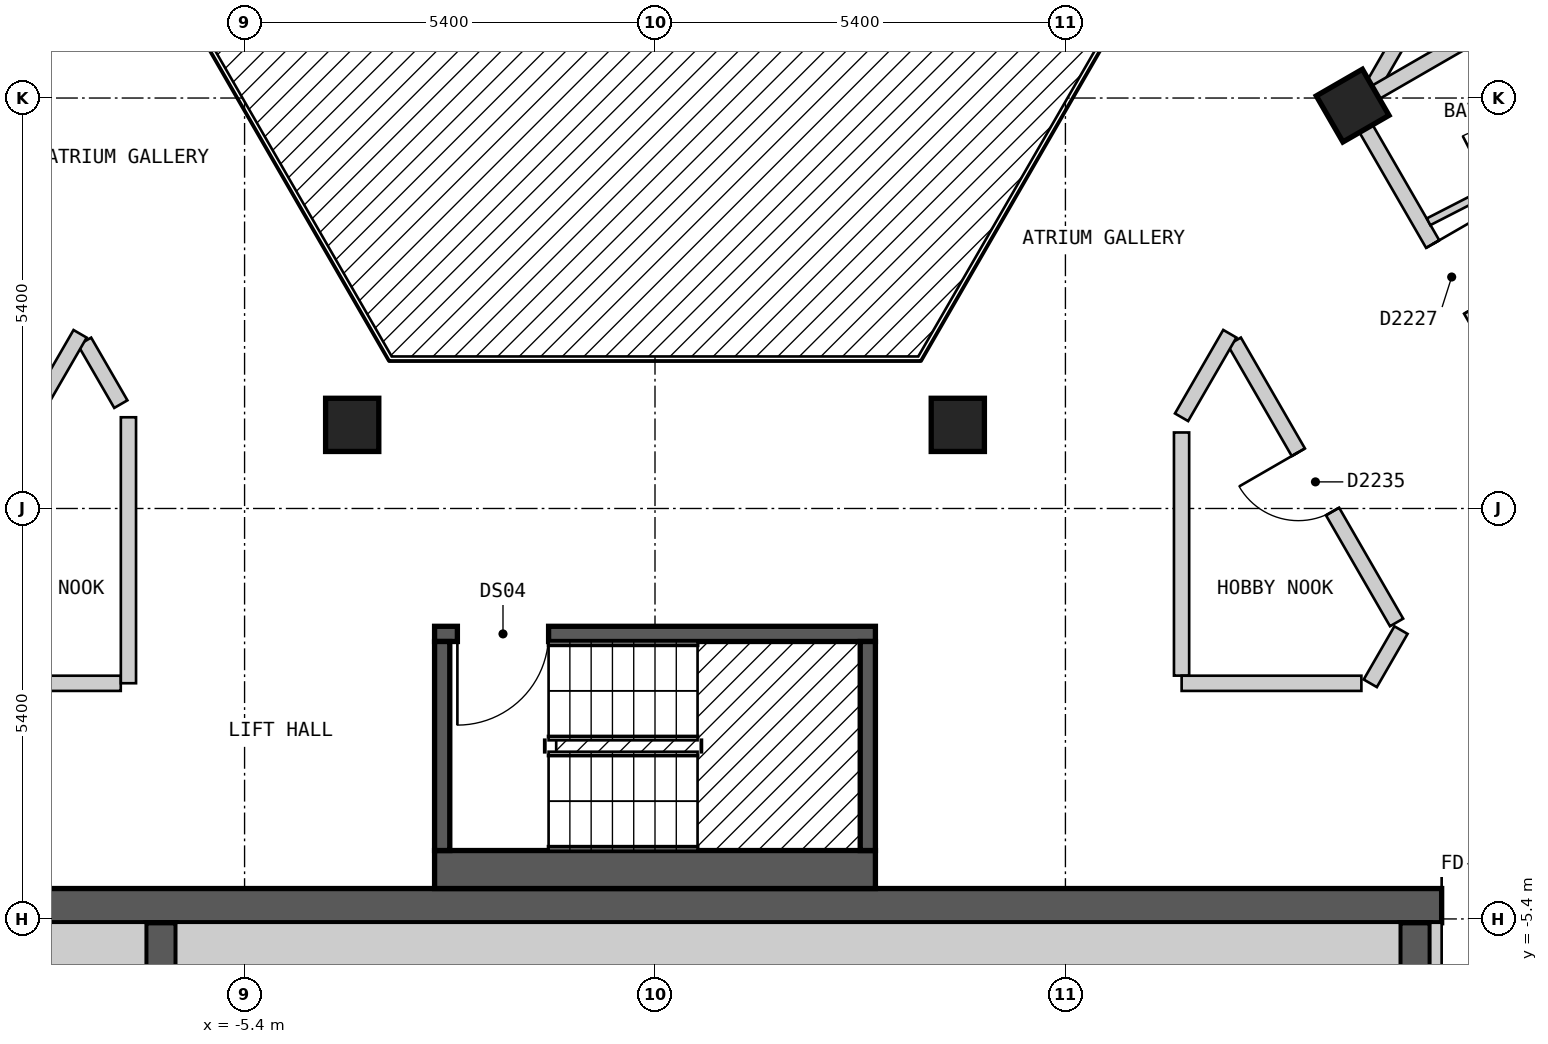
"""IFC4 building model, lengths in metres.
Left out: names, types, materials, properties, quantities, classifications, styles, units other than length and angle.
Written with IfcOpenShell. Run it as: python <this file> out.ifc"""

import sys

from ifc_helpers import new_model, si_unit, direction, frame, frame_2d, origin, origin_2d, place, context, subcontext, project, spatial, rectangle, extrude, element, fill, save


model = new_model("IFC4")
c1 = context("Model", 3, precision=1e-05, world=origin(), true_north=direction((0.0, 1.0)))
c2 = subcontext(c1, "Body", "Model", "MODEL_VIEW")
j1 = project(units=[si_unit("LENGTHUNIT", "METRE"), si_unit("PLANEANGLEUNIT", "RADIAN")], contexts=[c1])
p1 = place(None, origin())
s1 = spatial("IfcSite", under=j1, at=p1, CompositionType="ELEMENT")
p2 = place(p1, origin())
s2 = spatial("IfcBuilding", under=s1, at=p2, CompositionType="ELEMENT")
p3 = place(p2, frame((0.0, 0.0, 235.8)))
s3 = spatial("IfcBuildingStorey", under=s2, at=p3, CompositionType="ELEMENT", Elevation=235.8)
for number, where, z_axis, x_axis in (
    (1, (3.984, 1.1, 0.0), (0.0, 0.0, 1.0), (1.0, 0.0, 0.0)),
    (2, (9.179, 5.3, 0.0), (0.0, 0.0, 1.0), (-0.5, 0.866, 0.0)),
    (3, (-3.984, 1.1, 0.0), (0.0, 0.0, 1.0), (1.0, 0.0, 0.0)),
):
    element("IfcColumn", number, at=place(p3, frame(where, z_axis=z_axis, x_axis=x_axis)), inside=s3, PredefinedType="COLUMN", context=c2, shape_type="SweptSolid", body=[
        extrude(rectangle(XDim=0.7, YDim=0.7, at=origin_2d()), origin(), (0.0, 0.0, 1.0), 3.0),
    ])
p4 = place(p3, frame((-13.3, -5.225, 0.0), z_axis=(0.0, 0.0, 1.0), x_axis=(1.0, 0.0, 0.0)))
e4 = element("IfcWall", 4, at=p4, inside=s3, PredefinedType="SHEAR", context=c2, shape_type="SweptSolid", body=[
    extrude(rectangle(XDim=26.6, YDim=0.45, at=frame_2d((13.3, 0.0))), origin(), (0.0, 0.0, 1.0), 2.7),
])
p5 = place(p4, frame((23.65, 0.0, 0.0)))
e5 = element("IfcOpeningElement", 5, at=p5, cuts=e4, PredefinedType="OPENING", context=c2, shape_type="SweptSolid", body=[
    extrude(rectangle(XDim=1.2, YDim=2.1, at=frame_2d((0.6, 1.05))), frame((0.0, 0.235, 0.0), z_axis=(0.0, -1.0, 0.0), x_axis=(1.0, 0.0, 0.0)), (0.0, 0.0, 1.0), 0.47),
])
for number, where, z_axis, x_axis in (
    (6, (-6.5, -9.15, 0.0), (0.0, 0.0, 1.0), (0.0, 1.0, 0.0)),
    (7, (10.0, -9.15, 0.0), (0.0, 0.0, 1.0), (0.0, 1.0, 0.0)),
):
    element("IfcWall", number, at=place(p3, frame(where, z_axis=z_axis, x_axis=x_axis)), inside=s3, PredefinedType="SHEAR", context=c2, shape_type="SweptSolid", body=[
        extrude(rectangle(XDim=3.7, YDim=0.4, at=frame_2d((1.85, 0.0))), origin(), (0.0, 0.0, 1.0), 2.7),
    ])
p6 = place(p3, frame((-2.9, -4.75, 0.0), z_axis=(0.0, 0.0, 1.0), x_axis=(1.0, 0.0, 0.0)))
e8 = element("IfcWall", 8, at=p6, inside=s3, PredefinedType="SOLIDWALL", context=c2, shape_type="SweptSolid", body=[
    extrude(rectangle(XDim=5.8, YDim=0.5, at=frame_2d((2.9, 0.0))), origin(), (0.0, 0.0, 1.0), 2.7),
])
p7 = place(p3, frame((-2.9, -1.65, 0.0), z_axis=(0.0, 0.0, 1.0), x_axis=(1.0, 0.0, 0.0)))
e9 = element("IfcWall", 9, at=p7, inside=s3, PredefinedType="SOLIDWALL", context=c2, shape_type="SweptSolid", body=[
    extrude(rectangle(XDim=5.8, YDim=0.2, at=frame_2d((2.9, 0.0))), origin(), (0.0, 0.0, 1.0), 2.7),
])
p8 = place(p7, frame((0.3, 0.0, 0.0)))
e10 = element("IfcOpeningElement", 10, at=p8, cuts=e9, PredefinedType="OPENING", context=c2, shape_type="SweptSolid", body=[
    extrude(rectangle(XDim=1.2, YDim=2.1, at=frame_2d((0.6, 1.05))), frame((0.0, 0.11, 0.0), z_axis=(0.0, -1.0, 0.0), x_axis=(1.0, 0.0, 0.0)), (0.0, 0.0, 1.0), 0.22),
])
for number, where, z_axis, x_axis in (
    (11, (-2.8, -4.5, 0.0), (0.0, 0.0, 1.0), (0.0, 1.0, 0.0)),
    (12, (2.8, -4.5, 0.0), (0.0, 0.0, 1.0), (0.0, 1.0, 0.0)),
):
    element("IfcWall", number, at=place(p3, frame(where, z_axis=z_axis, x_axis=x_axis)), inside=s3, PredefinedType="SOLIDWALL", context=c2, shape_type="SweptSolid", body=[
        extrude(rectangle(XDim=2.75, YDim=0.2, at=frame_2d((1.375, 0.0))), origin(), (0.0, 0.0, 1.0), 2.7),
    ])
p9 = place(p3, frame((-7.505, 2.198, 0.0), z_axis=(0.0, 0.0, 1.0), x_axis=(0.500409926597, -0.865788603161, 0.0)))
e13 = element("IfcWall", 13, at=p9, inside=s3, PredefinedType="PARTITIONING", context=c2, shape_type="SweptSolid", body=[
    extrude(rectangle(XDim=0.953, YDim=0.2, at=frame_2d((0.477, 0.0))), origin(), (0.0, 0.0, 1.0), 2.7),
])
p10 = place(p3, frame((7.622, 2.199, 0.0), z_axis=(0.0, 0.0, 1.0), x_axis=(0.499994660107, -0.866028486751, 0.0)))
e14 = element("IfcWall", 14, at=p10, inside=s3, PredefinedType="PARTITIONING", context=c2, shape_type="SweptSolid", body=[
    extrude(rectangle(XDim=4.27, YDim=0.2, at=frame_2d((2.135, 0.0))), origin(), (0.0, 0.0, 1.0), 2.7),
])
p11 = place(p10, frame((1.685, 0.0, 0.0)))
e15 = element("IfcOpeningElement", 15, at=p11, cuts=e14, PredefinedType="OPENING", context=c2, shape_type="SweptSolid", body=[
    extrude(rectangle(XDim=0.9, YDim=2.1, at=frame_2d((0.45, 1.05))), frame((0.0, 0.11, 0.0), z_axis=(0.0, -1.0, 0.0), x_axis=(1.0, 0.0, 0.0)), (0.0, 0.0, 1.0), 0.22),
])
p12 = place(p3, frame((9.238, 5.2, 0.0), z_axis=(0.0, 0.0, 1.0), x_axis=(0.500025705601, -0.86601056214, 0.0)))
e16 = element("IfcWall", 16, at=p12, inside=s3, PredefinedType="PARTITIONING", context=c2, shape_type="SweptSolid", body=[
    extrude(rectangle(XDim=7.735, YDim=0.2, at=frame_2d((3.868, 0.0))), origin(), (0.0, 0.0, 1.0), 2.7),
])
p13 = place(p12, frame((6.898, 0.0, 0.0)))
e17 = element("IfcOpeningElement", 17, at=p13, cuts=e16, PredefinedType="OPENING", context=c2, shape_type="SweptSolid", body=[
    extrude(rectangle(XDim=0.8, YDim=2.1, at=frame_2d((0.4, 1.05))), frame((0.0, 0.11, 0.0), z_axis=(0.0, -1.0, 0.0), x_axis=(1.0, 0.0, 0.0)), (0.0, 0.0, 1.0), 0.22),
])
p14 = place(p12, frame((1.988, 0.0, 0.0)))
e18 = element("IfcOpeningElement", 18, at=p14, cuts=e16, PredefinedType="OPENING", context=c2, shape_type="SweptSolid", body=[
    extrude(rectangle(XDim=1.0, YDim=2.1, at=frame_2d((0.5, 1.05))), frame((0.0, 0.11, 0.0), z_axis=(0.0, -1.0, 0.0), x_axis=(1.0, 0.0, 0.0)), (0.0, 0.0, 1.0), 0.22),
])
p15 = place(p3, frame((6.928, 1.0, 0.0), z_axis=(0.0, 0.0, 1.0), x_axis=(0.0, -1.0, 0.0)))
e19 = element("IfcWall", 19, at=p15, inside=s3, PredefinedType="PARTITIONING", context=c2, shape_type="SweptSolid", body=[
    extrude(rectangle(XDim=3.199, YDim=0.2, at=frame_2d((1.6, 0.0))), origin(), (0.0, 0.0, 1.0), 2.7),
])
p16 = place(p3, frame((-9.41, -2.3, 0.0), z_axis=(0.0, 0.0, 1.0), x_axis=(1.0, 0.0, 0.0)))
e20 = element("IfcWall", 20, at=p16, inside=s3, PredefinedType="PARTITIONING", context=c2, shape_type="SweptSolid", body=[
    extrude(rectangle(XDim=2.381, YDim=0.2, at=frame_2d((1.19, 0.0))), origin(), (0.0, 0.0, 1.0), 2.7),
])
p17 = place(p3, frame((6.929, -2.3, 0.0), z_axis=(0.0, 0.0, 1.0), x_axis=(1.0, 0.0, 0.0)))
e21 = element("IfcWall", 21, at=p17, inside=s3, PredefinedType="PARTITIONING", context=c2, shape_type="SweptSolid", body=[
    extrude(rectangle(XDim=2.365, YDim=0.2, at=frame_2d((1.183, 0.0))), origin(), (0.0, 0.0, 1.0), 2.7),
])
p18 = place(p3, frame((6.928, 1.2, 0.0), z_axis=(0.0, 0.0, 1.0), x_axis=(0.500255167297, 0.865878032746, 0.0)))
e22 = element("IfcWall", 22, at=p18, inside=s3, PredefinedType="PARTITIONING", context=c2, shape_type="SweptSolid", body=[
    extrude(rectangle(XDim=1.269, YDim=0.2, at=frame_2d((0.635, 0.0))), origin(), (0.0, 0.0, 1.0), 2.7),
])
p19 = place(p3, frame((9.354, 5.401, 0.0), z_axis=(0.0, 0.0, 1.0), x_axis=(0.499849222119, 0.866112437936, 0.0)))
e23 = element("IfcWall", 23, at=p19, inside=s3, PredefinedType="PARTITIONING", context=c2, shape_type="SweptSolid", body=[
    extrude(rectangle(XDim=3.001, YDim=0.2, at=frame_2d((1.5, 0.0))), origin(), (0.0, 0.0, 1.0), 2.7),
])
p20 = place(p3, frame((9.411, -2.3, 0.0), z_axis=(0.0, 0.0, 1.0), x_axis=(0.499940363534, 0.866059832176, 0.0)))
e24 = element("IfcWall", 24, at=p20, inside=s3, PredefinedType="PARTITIONING", context=c2, shape_type="SweptSolid", body=[
    extrude(rectangle(XDim=0.808, YDim=0.2, at=frame_2d((0.404, 0.0))), origin(), (0.0, 0.0, 1.0), 2.7),
])
p21 = place(p3, frame((-9.815, -1.6, 0.0), z_axis=(0.0, 0.0, 1.0), x_axis=(0.500058909736, 0.865991389561, 0.0)))
e25 = element("IfcWall", 25, at=p21, inside=s3, PredefinedType="PARTITIONING", context=c2, shape_type="SweptSolid", body=[
    extrude(rectangle(XDim=4.501, YDim=0.2, at=frame_2d((2.251, 0.0))), origin(), (0.0, 0.0, 1.0), 2.7),
])
p22 = place(p21, frame((1.801, 0.0, 0.0)))
e26 = element("IfcOpeningElement", 26, at=p22, cuts=e25, PredefinedType="OPENING", context=c2, shape_type="SweptSolid", body=[
    extrude(rectangle(XDim=0.9, YDim=2.1, at=frame_2d((0.45, 1.05))), frame((0.0, 0.11, 0.0), z_axis=(0.0, -1.0, 0.0), x_axis=(1.0, 0.0, 0.0)), (0.0, 0.0, 1.0), 0.22),
])
p23 = place(p3, frame((-6.928, -2.299, 0.0), z_axis=(0.0, 0.0, 1.0), x_axis=(0.0, 1.0, 0.0)))
e27 = element("IfcWall", 27, at=p23, inside=s3, PredefinedType="PARTITIONING", context=c2, shape_type="SweptSolid", body=[
    extrude(rectangle(XDim=3.499, YDim=0.2, at=frame_2d((1.75, 0.0))), origin(), (0.0, 0.0, 1.0), 2.7),
])
p24 = place(p3, frame((10.178, 3.772, 0.0), z_axis=(0.0, 0.0, 1.0), x_axis=(0.889732071959, 0.456483121405, 0.0)))
e28 = element("IfcWall", 28, at=p24, inside=s3, PredefinedType="PARTITIONING", context=c2, shape_type="SweptSolid", body=[
    extrude(rectangle(XDim=2.679, YDim=0.1, at=frame_2d((1.34, 0.0))), origin(), (0.0, 0.0, 1.0), 2.7),
])
p25 = place(p24, frame((0.915, 0.0, 0.0)))
e29 = element("IfcOpeningElement", 29, at=p25, cuts=e28, PredefinedType="OPENING", context=c2, shape_type="SweptSolid", body=[
    extrude(rectangle(XDim=0.8, YDim=2.1, at=frame_2d((0.4, 1.05))), frame((0.0, 0.06, 0.0), z_axis=(0.0, -1.0, 0.0), x_axis=(1.0, 0.0, 0.0)), (0.0, 0.0, 1.0), 0.12),
])
p26 = place(p3, frame((9.457, 5.461, 0.0), z_axis=(0.0, 0.0, 1.0), x_axis=(0.866043818878, 0.499968102766, 0.0)))
e30 = element("IfcWall", 30, at=p26, inside=s3, PredefinedType="PARTITIONING", context=c2, shape_type="SweptSolid", body=[
    extrude(rectangle(XDim=9.779, YDim=0.2, at=frame_2d((4.89, 0.0))), origin(), (0.0, 0.0, 1.0), 2.7),
])
p27 = place(p3, frame((-12.1, -5.825, 0.0), z_axis=(0.0, 0.0, 1.0), x_axis=(1.0, 0.0, 0.0)))
e31 = element("IfcWall", 31, at=p27, inside=s3, PredefinedType="SOLIDWALL", context=c2, shape_type="SweptSolid", body=[
    extrude(rectangle(XDim=5.4, YDim=0.75, at=frame_2d((2.7, 0.0))), origin(), (0.0, 0.0, 1.0), 2.7),
])
p28 = place(p3, frame((-6.3, -5.825, 0.0), z_axis=(0.0, 0.0, 1.0), x_axis=(1.0, 0.0, 0.0)))
e32 = element("IfcWall", 32, at=p28, inside=s3, PredefinedType="SOLIDWALL", context=c2, shape_type="SweptSolid", body=[
    extrude(rectangle(XDim=16.1, YDim=0.75, at=frame_2d((8.05, 0.0))), origin(), (0.0, 0.0, 1.0), 2.7),
])
p29 = place(p3, frame((10.275, -6.2, 0.0), z_axis=(0.0, 0.0, 1.0), x_axis=(0.0, 1.0, 0.0)))
e33 = element("IfcWall", 33, at=p29, inside=s3, PredefinedType="PARTITIONING", context=c2, shape_type="SweptSolid", body=[
    extrude(rectangle(XDim=0.75, YDim=0.15, at=frame_2d((0.375, 0.0))), origin(), (0.0, 0.0, 1.0), 2.7),
])
p30 = place(p8, origin())
e34 = element("IfcDoor", 34, at=p30, inside=s3, OperationType="SINGLE_SWING_LEFT", PredefinedType="DOOR", context=c2, shape_type="SweptSolid", body=[
    extrude(rectangle(XDim=1.2, YDim=2.1, at=frame_2d((0.6, 1.05))), frame((0.0, 0.025, 0.0), z_axis=(0.0, -1.0, 0.0), x_axis=(1.0, 0.0, 0.0)), (0.0, 0.0, 1.0), 0.05),
])
fill(e10, e34)
p31 = place(p14, origin())
e35 = element("IfcDoor", 35, at=p31, inside=s3, OperationType="SINGLE_SWING_LEFT", PredefinedType="DOOR", context=c2, shape_type="SweptSolid", body=[
    extrude(rectangle(XDim=1.0, YDim=2.1, at=frame_2d((0.5, 1.05))), frame((0.0, 0.025, 0.0), z_axis=(0.0, -1.0, 0.0), x_axis=(1.0, 0.0, 0.0)), (0.0, 0.0, 1.0), 0.05),
])
fill(e18, e35)
p32 = place(p11, origin())
e36 = element("IfcDoor", 36, at=p32, inside=s3, OperationType="SINGLE_SWING_LEFT", PredefinedType="DOOR", context=c2, shape_type="SweptSolid", body=[
    extrude(rectangle(XDim=0.9, YDim=2.1, at=frame_2d((0.45, 1.05))), frame((0.0, 0.025, 0.0), z_axis=(0.0, -1.0, 0.0), x_axis=(1.0, 0.0, 0.0)), (0.0, 0.0, 1.0), 0.05),
])
fill(e15, e36)
p33 = place(p5, origin())
e37 = element("IfcDoor", 37, at=p33, inside=s3, OperationType="DOUBLE_DOOR_SINGLE_SWING", PredefinedType="DOOR", context=c2, shape_type="SweptSolid", body=[
    extrude(rectangle(XDim=1.2, YDim=2.1, at=frame_2d((0.6, 1.05))), frame((0.0, 0.025, 0.0), z_axis=(0.0, -1.0, 0.0), x_axis=(1.0, 0.0, 0.0)), (0.0, 0.0, 1.0), 0.05),
])
fill(e5, e37)
save(model, sys.argv[1])
